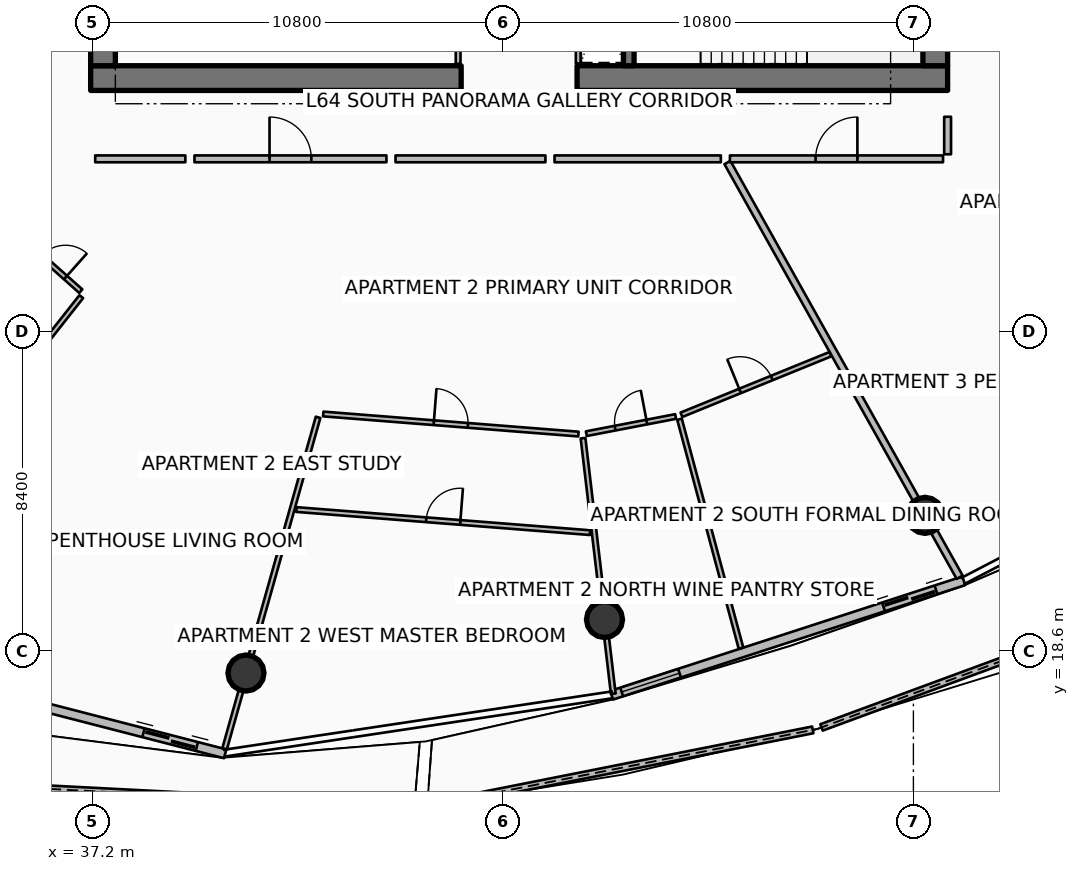
"""IFC4 building model, lengths in metres.
Left out: names, types, materials, properties, quantities, classifications, styles, units other than length and angle.
Written with IfcOpenShell. Run it as: python <this file> out.ifc"""

import sys

from ifc_helpers import new_model, si_unit, direction, frame, frame_2d, origin, origin_2d, place, context, subcontext, project, spatial, polyline, rectangle, circle, outline, extrude, element, fill, save


model = new_model("IFC4")
c1 = context("Model", 3, precision=1e-05, world=origin(), true_north=direction((0.0, 1.0)))
c2 = subcontext(c1, "Body", "Model", "MODEL_VIEW")
j1 = project(units=[si_unit("LENGTHUNIT", "METRE"), si_unit("PLANEANGLEUNIT", "RADIAN")], contexts=[c1])
p1 = place(None, origin())
s1 = spatial("IfcSite", under=j1, at=p1, CompositionType="ELEMENT")
p2 = place(p1, origin())
s2 = spatial("IfcBuilding", under=s1, at=p2, CompositionType="ELEMENT")
p3 = place(p2, frame((0.0, 0.0, 255.95)))
s3 = spatial("IfcBuildingStorey", under=s2, at=p3, CompositionType="ELEMENT", Elevation=255.95)
for number, where, z_axis, x_axis in (
    (1, (37.15, 33.675, 0.0), (0.0, 0.0, 1.0), (1.0, 0.0, 0.0)),
    (2, (49.95, 33.675, 0.0), (0.0, 0.0, 1.0), (1.0, 0.0, 0.0)),
):
    element("IfcWall", number, at=place(p3, frame(where, z_axis=z_axis, x_axis=x_axis)), inside=s3, PredefinedType="SHEAR", context=c2, shape_type="SweptSolid", body=[
        extrude(rectangle(XDim=9.75, YDim=0.65, at=frame_2d((4.875, 0.0))), origin(), (0.0, 0.0, 1.0), 3.85),
    ])
for number, where, z_axis, x_axis in (
    (3, (37.475, 34.0, 0.0), (0.0, 0.0, 1.0), (0.0, 1.0, 0.0)),
    (4, (59.375, 34.0, 0.0), (0.0, 0.0, 1.0), (0.0, 1.0, 0.0)),
):
    element("IfcWall", number, at=place(p3, frame(where, z_axis=z_axis, x_axis=x_axis)), inside=s3, PredefinedType="SHEAR", context=c2, shape_type="SweptSolid", body=[
        extrude(rectangle(XDim=16.0, YDim=0.65, at=frame_2d((8.0, 0.0))), origin(), (0.0, 0.0, 1.0), 3.85),
    ])
p4 = place(p3, frame((51.31, 34.0, 0.0), z_axis=(0.0, 0.0, 1.0), x_axis=(0.0, 1.0, 0.0)))
e5 = element("IfcWall", 5, at=p4, inside=s3, PredefinedType="SHEAR", context=c2, shape_type="SweptSolid", body=[
    extrude(rectangle(XDim=3.5, YDim=0.28, at=frame_2d((1.75, 0.0))), origin(), (0.0, 0.0, 1.0), 3.85),
])
for number, where, z_axis, x_axis in (
    (6, (41.237, 18.021, 0.0), (0.0, 0.0, 1.0), (1.0, 0.0, 0.0)),
    (7, (50.671, 19.429, 0.0), (0.0, 0.0, 1.0), (1.0, 0.0, 0.0)),
    (8, (59.105, 22.17, 0.0), (0.0, 0.0, 1.0), (1.0, 0.0, 0.0)),
):
    element("IfcColumn", number, at=place(p3, frame(where, z_axis=z_axis, x_axis=x_axis)), inside=s3, PredefinedType="COLUMN", context=c2, shape_type="SweptSolid", body=[
        extrude(circle(Radius=0.475, at=origin_2d()), origin(), (0.0, 0.0, 1.0), 3.59),
    ])
p5 = place(p3, frame((34.395, 15.057, 0.0), z_axis=(0.0, 0.0, 1.0), x_axis=(0.998675719667, -0.051447127692, 0.0)))
e9 = element("IfcWall", 9, at=p5, inside=s3, PredefinedType="PARAPET", context=c2, shape_type="SweptSolid", body=[
    extrude(outline(polyline([(0.0, 0.0), (11.285, 0.0), (11.285, 1.224), (5.642, 1.127), (0.0, 1.148), (0.0, 0.0)])), frame((0.0, 0.09, 0.0), z_axis=(0.0, -1.0, 0.0), x_axis=(1.0, 0.0, 0.0)), (0.0, 0.0, 1.0), 0.18),
])
p6 = place(p3, frame((46.006, 14.514, 0.0), z_axis=(0.0, 0.0, 1.0), x_axis=(0.980919619001, 0.194413736807, 0.0)))
e10 = element("IfcWall", 10, at=p6, inside=s3, PredefinedType="PARAPET", context=c2, shape_type="SweptSolid", body=[
    extrude(outline(polyline([(0.0, 0.0), (10.344, 0.0), (10.344, 1.632), (5.172, 1.418), (0.0, 1.233), (0.0, 0.0)])), frame((0.0, 0.09, 0.0), z_axis=(0.0, -1.0, 0.0), x_axis=(1.0, 0.0, 0.0)), (0.0, 0.0, 1.0), 0.18),
])
p7 = place(p3, frame((56.382, 16.59, 0.0), z_axis=(0.0, 0.0, 1.0), x_axis=(0.938191788678, 0.346115829828, 0.0)))
e11 = element("IfcWall", 11, at=p7, inside=s3, PredefinedType="PARAPET", context=c2, shape_type="SweptSolid", body=[
    extrude(outline(polyline([(0.0, 0.0), (10.611, 0.0), (10.611, 1.86), (5.305, 1.798), (0.0, 1.632), (0.0, 0.0)])), frame((0.0, 0.09, 0.0), z_axis=(0.0, -1.0, 0.0), x_axis=(1.0, 0.0, 0.0)), (0.0, 0.0, 1.0), 0.18),
])
p8 = place(p3, frame((29.614, 18.751, 0.0), z_axis=(0.0, 0.0, 1.0), x_axis=(0.968343758421, -0.249620442927, 0.0)))
e12 = element("IfcWall", 12, at=p8, inside=s3, PredefinedType="SOLIDWALL", context=c2, shape_type="SweptSolid", body=[
    extrude(rectangle(XDim=11.438, YDim=0.24, at=frame_2d((5.719, 0.0))), origin(), (0.0, 0.0, 1.0), 2.54),
])
p9 = place(p8, frame((9.218, 0.0, 0.0)))
e13 = element("IfcOpeningElement", 13, at=p9, cuts=e12, PredefinedType="OPENING", context=c2, shape_type="SweptSolid", body=[
    extrude(rectangle(XDim=1.45, YDim=2.15, at=frame_2d((0.725, 1.075))), frame((0.0, 0.13, 0.0), z_axis=(0.0, -1.0, 0.0), x_axis=(1.0, 0.0, 0.0)), (0.0, 0.0, 1.0), 0.26),
])
p10 = place(p8, frame((0.28, 0.0, 0.65)))
e14 = element("IfcOpeningElement", 14, at=p10, cuts=e12, PredefinedType="OPENING", context=c2, shape_type="SweptSolid", body=[
    extrude(rectangle(XDim=1.6, YDim=1.5, at=frame_2d((0.8, 0.75))), frame((0.0, 0.13, 0.0), z_axis=(0.0, -1.0, 0.0), x_axis=(1.0, 0.0, 0.0)), (0.0, 0.0, 1.0), 0.26),
])
p11 = place(p3, frame((50.858, 17.436, 0.0), z_axis=(0.0, 0.0, 1.0), x_axis=(0.951055974609, 0.309018661507, 0.0)))
e15 = element("IfcWall", 15, at=p11, inside=s3, PredefinedType="SOLIDWALL", context=c2, shape_type="SweptSolid", body=[
    extrude(rectangle(XDim=9.745, YDim=0.24, at=frame_2d((4.873, 0.0))), origin(), (0.0, 0.0, 1.0), 2.54),
])
p12 = place(p11, frame((7.525, 0.0, 0.0)))
e16 = element("IfcOpeningElement", 16, at=p12, cuts=e15, PredefinedType="OPENING", context=c2, shape_type="SweptSolid", body=[
    extrude(rectangle(XDim=1.45, YDim=2.15, at=frame_2d((0.725, 1.075))), frame((0.0, 0.13, 0.0), z_axis=(0.0, -1.0, 0.0), x_axis=(1.0, 0.0, 0.0)), (0.0, 0.0, 1.0), 0.26),
])
p13 = place(p11, frame((0.28, 0.0, 0.65)))
e17 = element("IfcOpeningElement", 17, at=p13, cuts=e15, PredefinedType="OPENING", context=c2, shape_type="SweptSolid", body=[
    extrude(rectangle(XDim=1.6, YDim=1.5, at=frame_2d((0.8, 0.75))), frame((0.0, 0.13, 0.0), z_axis=(0.0, -1.0, 0.0), x_axis=(1.0, 0.0, 0.0)), (0.0, 0.0, 1.0), 0.26),
])
p14 = place(p3, frame((46.82, 34.05, 0.0), z_axis=(0.0, 0.0, 1.0), x_axis=(0.0, 1.0, 0.0)))
e18 = element("IfcWall", 18, at=p14, inside=s3, PredefinedType="PARTITIONING", context=c2, shape_type="SweptSolid", body=[
    extrude(rectangle(XDim=2.03, YDim=0.125, at=frame_2d((1.015, 0.0))), origin(), (0.0, 0.0, 1.0), 3.03),
])
p15 = place(p3, frame((49.98, 34.06, 0.0), z_axis=(0.0, 0.0, 1.0), x_axis=(0.0, 1.0, 0.0)))
e19 = element("IfcWall", 19, at=p15, inside=s3, PredefinedType="PARTITIONING", context=c2, shape_type="SweptSolid", body=[
    extrude(rectangle(XDim=3.4, YDim=0.125, at=frame_2d((1.7, 0.0))), origin(), (0.0, 0.0, 1.0), 3.03),
])
p16 = place(p3, frame((37.054, 35.87, 0.0), z_axis=(0.0, 0.0, 1.0), x_axis=(-0.872490186067, -0.488631635506, 0.0)))
e20 = element("IfcWall", 20, at=p16, inside=s3, PredefinedType="PARTITIONING", context=c2, shape_type="SweptSolid", body=[
    extrude(rectangle(XDim=17.884, YDim=0.18, at=frame_2d((8.942, 0.0))), origin(), (0.0, 0.0, 1.0), 2.957),
])
p17 = place(p3, frame((53.906, 31.454, 0.0), z_axis=(0.0, 0.0, 1.0), x_axis=(0.48862654941, -0.872493034477, 0.0)))
e21 = element("IfcWall", 21, at=p17, inside=s3, PredefinedType="PARTITIONING", context=c2, shape_type="SweptSolid", body=[
    extrude(rectangle(XDim=12.508, YDim=0.18, at=frame_2d((6.254, 0.0))), origin(), (0.0, 0.0, 1.0), 2.957),
])
p18 = place(p3, frame((39.882, 31.55, 0.0), z_axis=(0.0, 0.0, 1.0), x_axis=(1.0, 0.0, 0.0)))
e22 = element("IfcWall", 22, at=p18, inside=s3, PredefinedType="PARTITIONING", context=c2, shape_type="SweptSolid", body=[
    extrude(rectangle(XDim=5.051, YDim=0.18, at=frame_2d((2.525, 0.0))), origin(), (0.0, 0.0, 1.0), 2.957),
])
p19 = place(p18, frame((1.975, 0.0, 0.0)))
e23 = element("IfcOpeningElement", 23, at=p19, cuts=e22, PredefinedType="OPENING", context=c2, shape_type="SweptSolid", body=[
    extrude(rectangle(XDim=1.1, YDim=2.1, at=frame_2d((0.55, 1.05))), frame((0.0, 0.1, 0.0), z_axis=(0.0, -1.0, 0.0), x_axis=(1.0, 0.0, 0.0)), (0.0, 0.0, 1.0), 0.2),
])
p20 = place(p3, frame((37.27, 31.55, 0.0), z_axis=(0.0, 0.0, 1.0), x_axis=(1.0, 0.0, 0.0)))
e24 = element("IfcWall", 24, at=p20, inside=s3, PredefinedType="PARTITIONING", context=c2, shape_type="SweptSolid", body=[
    extrude(rectangle(XDim=2.372, YDim=0.18, at=frame_2d((1.186, 0.0))), origin(), (0.0, 0.0, 1.0), 2.957),
])
p21 = place(p3, frame((36.903, 27.924, 0.0), z_axis=(0.0, 0.0, 1.0), x_axis=(-0.619090039254, -0.785320013304, 0.0)))
e25 = element("IfcWall", 25, at=p21, inside=s3, PredefinedType="PARTITIONING", context=c2, shape_type="SweptSolid", body=[
    extrude(rectangle(XDim=11.672, YDim=0.125, at=frame_2d((5.836, 0.0))), origin(), (0.0, 0.0, 1.0), 2.957),
])
p22 = place(p3, frame((35.45, 29.35, 0.0), z_axis=(0.0, 0.0, 1.0), x_axis=(0.747360411924, -0.664418854857, 0.0)))
e26 = element("IfcWall", 26, at=p22, inside=s3, PredefinedType="PARTITIONING", context=c2, shape_type="SweptSolid", body=[
    extrude(rectangle(XDim=1.928, YDim=0.125, at=frame_2d((0.964, 0.0))), origin(), (0.0, 0.0, 1.0), 2.957),
])
p23 = place(p22, frame((0.539, 0.0, 0.0)))
e27 = element("IfcOpeningElement", 27, at=p23, cuts=e26, PredefinedType="OPENING", context=c2, shape_type="SweptSolid", body=[
    extrude(rectangle(XDim=0.85, YDim=2.06, at=frame_2d((0.425, 1.03))), frame((0.0, 0.073, 0.0), z_axis=(0.0, -1.0, 0.0), x_axis=(1.0, 0.0, 0.0)), (0.0, 0.0, 1.0), 0.145),
])
p24 = place(p3, frame((45.173, 31.55, 0.0), z_axis=(0.0, 0.0, 1.0), x_axis=(1.0, 0.0, 0.0)))
e28 = element("IfcWall", 28, at=p24, inside=s3, PredefinedType="PARTITIONING", context=c2, shape_type="SweptSolid", body=[
    extrude(rectangle(XDim=3.944, YDim=0.18, at=frame_2d((1.972, 0.0))), origin(), (0.0, 0.0, 1.0), 2.957),
])
p25 = place(p3, frame((43.135, 24.749, 0.0), z_axis=(0.0, 0.0, 1.0), x_axis=(-0.271445445258, -0.962453827593, 0.0)))
e29 = element("IfcWall", 29, at=p25, inside=s3, PredefinedType="PARTITIONING", context=c2, shape_type="SweptSolid", body=[
    extrude(rectangle(XDim=9.061, YDim=0.125, at=frame_2d((4.53, 0.0))), origin(), (0.0, 0.0, 1.0), 2.957),
])
p26 = place(p3, frame((43.271, 24.837, 0.0), z_axis=(0.0, 0.0, 1.0), x_axis=(0.996915339886, -0.078484425849, 0.0)))
e30 = element("IfcWall", 30, at=p26, inside=s3, PredefinedType="PARTITIONING", context=c2, shape_type="SweptSolid", body=[
    extrude(rectangle(XDim=6.735, YDim=0.125, at=frame_2d((3.367, 0.0))), origin(), (0.0, 0.0, 1.0), 2.957),
])
p27 = place(p26, frame((2.917, 0.0, 0.0)))
e31 = element("IfcOpeningElement", 31, at=p27, cuts=e30, PredefinedType="OPENING", context=c2, shape_type="SweptSolid", body=[
    extrude(rectangle(XDim=0.9, YDim=2.08, at=frame_2d((0.45, 1.04))), frame((0.0, 0.073, 0.0), z_axis=(0.0, -1.0, 0.0), x_axis=(1.0, 0.0, 0.0)), (0.0, 0.0, 1.0), 0.145),
])
p28 = place(p3, frame((42.562, 22.323, 0.0), z_axis=(0.0, 0.0, 1.0), x_axis=(0.996916778928, -0.078466144881, 0.0)))
e32 = element("IfcWall", 32, at=p28, inside=s3, PredefinedType="PARTITIONING", context=c2, shape_type="SweptSolid", body=[
    extrude(rectangle(XDim=7.754, YDim=0.125, at=frame_2d((3.877, 0.0))), origin(), (0.0, 0.0, 1.0), 2.957),
])
p29 = place(p28, frame((3.427, 0.0, 0.0)))
e33 = element("IfcOpeningElement", 33, at=p29, cuts=e32, PredefinedType="OPENING", context=c2, shape_type="SweptSolid", body=[
    extrude(rectangle(XDim=0.9, YDim=2.08, at=frame_2d((0.45, 1.04))), frame((0.0, 0.073, 0.0), z_axis=(0.0, -1.0, 0.0), x_axis=(1.0, 0.0, 0.0)), (0.0, 0.0, 1.0), 0.145),
])
p30 = place(p3, frame((49.357, 31.55, 0.0), z_axis=(0.0, 0.0, 1.0), x_axis=(1.0, 0.0, 0.0)))
e34 = element("IfcWall", 34, at=p30, inside=s3, PredefinedType="PARTITIONING", context=c2, shape_type="SweptSolid", body=[
    extrude(rectangle(XDim=4.376, YDim=0.18, at=frame_2d((2.188, 0.0))), origin(), (0.0, 0.0, 1.0), 2.957),
])
p31 = place(p3, frame((50.107, 24.2, 0.0), z_axis=(0.0, 0.0, 1.0), x_axis=(0.117552553428, -0.99306666301, 0.0)))
e35 = element("IfcWall", 35, at=p31, inside=s3, PredefinedType="PARTITIONING", context=c2, shape_type="SweptSolid", body=[
    extrude(rectangle(XDim=6.771, YDim=0.125, at=frame_2d((3.385, 0.0))), origin(), (0.0, 0.0, 1.0), 2.957),
])
p32 = place(p3, frame((52.646, 24.699, 0.0), z_axis=(0.0, 0.0, 1.0), x_axis=(0.259313772229, -0.965793128746, 0.0)))
e36 = element("IfcWall", 36, at=p32, inside=s3, PredefinedType="PARTITIONING", context=c2, shape_type="SweptSolid", body=[
    extrude(rectangle(XDim=6.238, YDim=0.125, at=frame_2d((3.119, 0.0))), origin(), (0.0, 0.0, 1.0), 3.03),
])
p33 = place(p3, frame((50.193, 24.318, 0.0), z_axis=(0.0, 0.0, 1.0), x_axis=(0.981978792413, 0.188991140667, 0.0)))
e37 = element("IfcWall", 37, at=p33, inside=s3, PredefinedType="PARTITIONING", context=c2, shape_type="SweptSolid", body=[
    extrude(rectangle(XDim=2.394, YDim=0.125, at=frame_2d((1.197, 0.0))), origin(), (0.0, 0.0, 1.0), 2.957),
])
p34 = place(p33, frame((0.772, 0.0, 0.0)))
e38 = element("IfcOpeningElement", 38, at=p34, cuts=e37, PredefinedType="OPENING", context=c2, shape_type="SweptSolid", body=[
    extrude(rectangle(XDim=0.85, YDim=2.06, at=frame_2d((0.425, 1.03))), frame((0.0, 0.073, 0.0), z_axis=(0.0, -1.0, 0.0), x_axis=(1.0, 0.0, 0.0)), (0.0, 0.0, 1.0), 0.145),
])
p35 = place(p3, frame((52.696, 24.816, 0.0), z_axis=(0.0, 0.0, 1.0), x_axis=(0.926276631798, 0.376844266754, 0.0)))
e39 = element("IfcWall", 39, at=p35, inside=s3, PredefinedType="PARTITIONING", context=c2, shape_type="SweptSolid", body=[
    extrude(rectangle(XDim=4.232, YDim=0.125, at=frame_2d((2.116, 0.0))), origin(), (0.0, 0.0, 1.0), 2.957),
])
p36 = place(p35, frame((1.666, 0.0, 0.0)))
e40 = element("IfcOpeningElement", 40, at=p36, cuts=e39, PredefinedType="OPENING", context=c2, shape_type="SweptSolid", body=[
    extrude(rectangle(XDim=0.9, YDim=2.08, at=frame_2d((0.45, 1.04))), frame((0.0, 0.073, 0.0), z_axis=(0.0, -1.0, 0.0), x_axis=(1.0, 0.0, 0.0)), (0.0, 0.0, 1.0), 0.145),
])
p37 = place(p3, frame((53.972, 31.55, 0.0), z_axis=(0.0, 0.0, 1.0), x_axis=(1.0, 0.0, 0.0)))
e41 = element("IfcWall", 41, at=p37, inside=s3, PredefinedType="PARTITIONING", context=c2, shape_type="SweptSolid", body=[
    extrude(rectangle(XDim=5.608, YDim=0.18, at=frame_2d((2.804, 0.0))), origin(), (0.0, 0.0, 1.0), 2.957),
])
p38 = place(p37, frame((2.254, 0.0, 0.0)))
e42 = element("IfcOpeningElement", 42, at=p38, cuts=e41, PredefinedType="OPENING", context=c2, shape_type="SweptSolid", body=[
    extrude(rectangle(XDim=1.1, YDim=2.1, at=frame_2d((0.55, 1.05))), frame((0.0, 0.1, 0.0), z_axis=(0.0, -1.0, 0.0), x_axis=(1.0, 0.0, 0.0)), (0.0, 0.0, 1.0), 0.2),
])
p39 = place(p3, frame((59.7, 31.67, 0.0), z_axis=(0.0, 0.0, 1.0), x_axis=(0.0, 1.0, 0.0)))
e43 = element("IfcWall", 43, at=p39, inside=s3, PredefinedType="PARTITIONING", context=c2, shape_type="SweptSolid", body=[
    extrude(rectangle(XDim=0.987, YDim=0.18, at=frame_2d((0.493, 0.0))), origin(), (0.0, 0.0, 1.0), 2.957),
])
p40 = place(p9, origin())
e44 = element("IfcDoor", 44, at=p40, inside=s3, OperationType="DOUBLE_DOOR_SLIDING", PredefinedType="DOOR", context=c2, shape_type="SweptSolid", body=[
    extrude(rectangle(XDim=1.45, YDim=2.15, at=frame_2d((0.725, 1.075))), frame((0.0, 0.025, 0.0), z_axis=(0.0, -1.0, 0.0), x_axis=(1.0, 0.0, 0.0)), (0.0, 0.0, 1.0), 0.05),
])
fill(e13, e44)
p41 = place(p12, origin())
e45 = element("IfcDoor", 45, at=p41, inside=s3, OperationType="DOUBLE_DOOR_SLIDING", PredefinedType="DOOR", context=c2, shape_type="SweptSolid", body=[
    extrude(rectangle(XDim=1.45, YDim=2.15, at=frame_2d((0.725, 1.075))), frame((0.0, 0.025, 0.0), z_axis=(0.0, -1.0, 0.0), x_axis=(1.0, 0.0, 0.0)), (0.0, 0.0, 1.0), 0.05),
])
fill(e16, e45)
p42 = place(p13, origin())
e46 = element("IfcWindow", 46, at=p42, inside=s3, PartitioningType="SINGLE_PANEL", PredefinedType="WINDOW", context=c2, shape_type="SweptSolid", body=[
    extrude(rectangle(XDim=1.6, YDim=1.5, at=frame_2d((0.8, 0.75))), frame((0.0, 0.03, 0.0), z_axis=(0.0, -1.0, 0.0), x_axis=(1.0, 0.0, 0.0)), (0.0, 0.0, 1.0), 0.06),
])
fill(e17, e46)
p43 = place(p19, origin())
e47 = element("IfcDoor", 47, at=p43, inside=s3, OperationType="SINGLE_SWING_LEFT", PredefinedType="DOOR", context=c2, shape_type="SweptSolid", body=[
    extrude(rectangle(XDim=1.1, YDim=2.1, at=frame_2d((0.55, 1.05))), frame((0.0, 0.025, 0.0), z_axis=(0.0, -1.0, 0.0), x_axis=(1.0, 0.0, 0.0)), (0.0, 0.0, 1.0), 0.05),
])
fill(e23, e47)
p44 = place(p23, origin())
e48 = element("IfcDoor", 48, at=p44, inside=s3, OperationType="SINGLE_SWING_RIGHT", PredefinedType="DOOR", context=c2, shape_type="SweptSolid", body=[
    extrude(rectangle(XDim=0.85, YDim=2.06, at=frame_2d((0.425, 1.03))), frame((0.0, 0.025, 0.0), z_axis=(0.0, -1.0, 0.0), x_axis=(1.0, 0.0, 0.0)), (0.0, 0.0, 1.0), 0.05),
])
fill(e27, e48)
p45 = place(p27, origin())
e49 = element("IfcDoor", 49, at=p45, inside=s3, OperationType="SINGLE_SWING_LEFT", PredefinedType="DOOR", context=c2, shape_type="SweptSolid", body=[
    extrude(rectangle(XDim=0.9, YDim=2.08, at=frame_2d((0.45, 1.04))), frame((0.0, 0.025, 0.0), z_axis=(0.0, -1.0, 0.0), x_axis=(1.0, 0.0, 0.0)), (0.0, 0.0, 1.0), 0.05),
])
fill(e31, e49)
p46 = place(p29, origin())
e50 = element("IfcDoor", 50, at=p46, inside=s3, OperationType="SINGLE_SWING_RIGHT", PredefinedType="DOOR", context=c2, shape_type="SweptSolid", body=[
    extrude(rectangle(XDim=0.9, YDim=2.08, at=frame_2d((0.45, 1.04))), frame((0.0, 0.025, 0.0), z_axis=(0.0, -1.0, 0.0), x_axis=(1.0, 0.0, 0.0)), (0.0, 0.0, 1.0), 0.05),
])
fill(e33, e50)
p47 = place(p34, origin())
e51 = element("IfcDoor", 51, at=p47, inside=s3, OperationType="SINGLE_SWING_RIGHT", PredefinedType="DOOR", context=c2, shape_type="SweptSolid", body=[
    extrude(rectangle(XDim=0.85, YDim=2.06, at=frame_2d((0.425, 1.03))), frame((0.0, 0.025, 0.0), z_axis=(0.0, -1.0, 0.0), x_axis=(1.0, 0.0, 0.0)), (0.0, 0.0, 1.0), 0.05),
])
fill(e38, e51)
p48 = place(p36, origin())
e52 = element("IfcDoor", 52, at=p48, inside=s3, OperationType="SINGLE_SWING_LEFT", PredefinedType="DOOR", context=c2, shape_type="SweptSolid", body=[
    extrude(rectangle(XDim=0.9, YDim=2.08, at=frame_2d((0.45, 1.04))), frame((0.0, 0.025, 0.0), z_axis=(0.0, -1.0, 0.0), x_axis=(1.0, 0.0, 0.0)), (0.0, 0.0, 1.0), 0.05),
])
fill(e40, e52)
p49 = place(p38, origin())
e53 = element("IfcDoor", 53, at=p49, inside=s3, OperationType="SINGLE_SWING_RIGHT", PredefinedType="DOOR", context=c2, shape_type="SweptSolid", body=[
    extrude(rectangle(XDim=1.1, YDim=2.1, at=frame_2d((0.55, 1.05))), frame((0.0, 0.025, 0.0), z_axis=(0.0, -1.0, 0.0), x_axis=(1.0, 0.0, 0.0)), (0.0, 0.0, 1.0), 0.05),
])
fill(e42, e53)
save(model, sys.argv[1])
